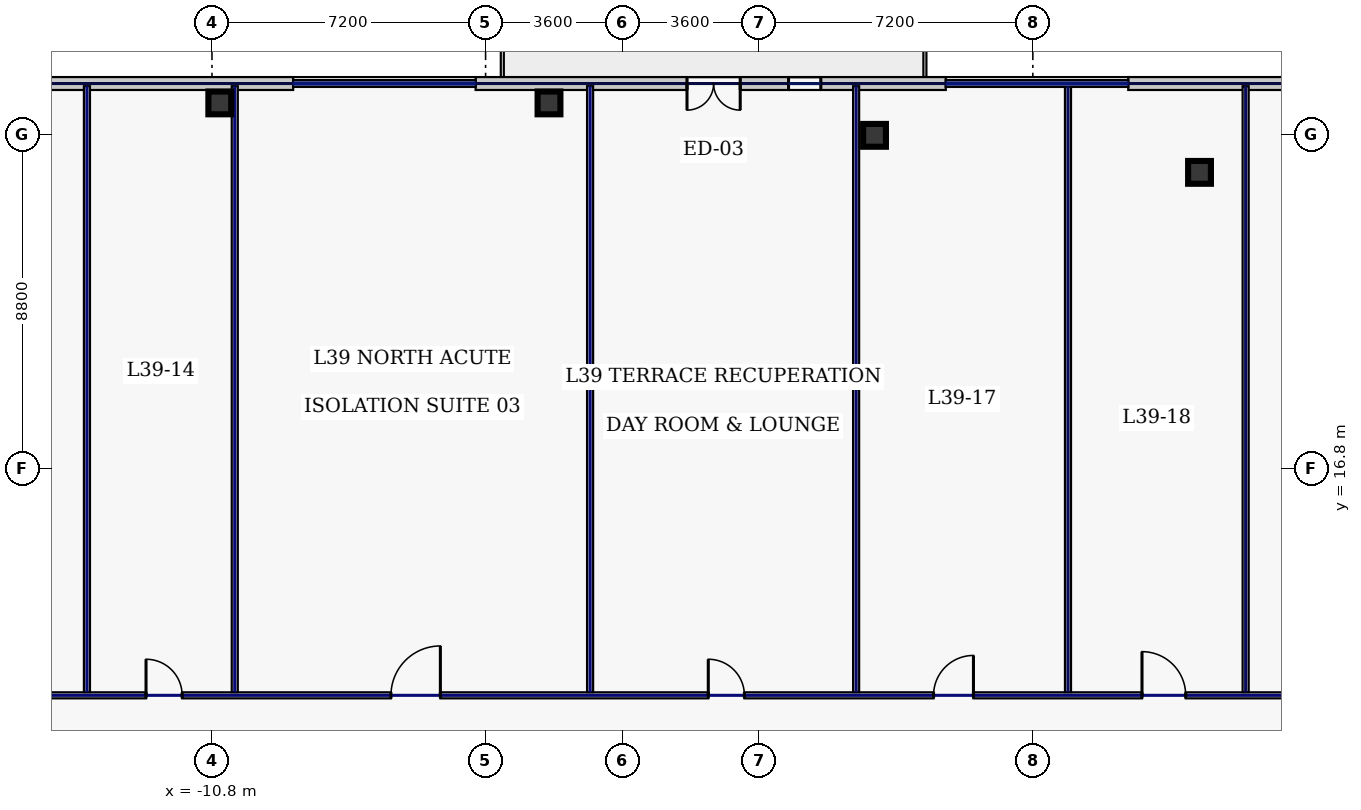
"""IFC4 building model, lengths in metres.
Left out: names, types, materials, properties, quantities, classifications, styles, units other than length and angle.
Written with IfcOpenShell. Run it as: python <this file> out.ifc"""

import sys

from ifc_helpers import new_model, si_unit, direction, frame, frame_2d, origin, origin_2d, place, context, subcontext, project, spatial, rectangle, hollow_rectangle, extrude, element, fill, save


model = new_model("IFC4")
c1 = context("Model", 3, precision=1e-05, world=origin(), true_north=direction((0.0, 1.0)))
c2 = subcontext(c1, "Body", "Model", "MODEL_VIEW")
j1 = project(units=[si_unit("LENGTHUNIT", "METRE"), si_unit("PLANEANGLEUNIT", "RADIAN")], contexts=[c1])
p1 = place(None, origin())
s1 = spatial("IfcSite", under=j1, at=p1, CompositionType="ELEMENT")
p2 = place(p1, origin())
s2 = spatial("IfcBuilding", under=s1, at=p2, CompositionType="ELEMENT")
p3 = place(p2, frame((0.0, 0.0, 172.2)))
s3 = spatial("IfcBuildingStorey", under=s2, at=p3, CompositionType="ELEMENT", Elevation=172.2)
for number, where, z_axis, x_axis in (
    (1, (15.186, 24.592, 0.0), (0.0, 0.0, 1.0), (1.0, 0.0, 0.0)),
    (2, (6.634, 25.567, 0.0), (0.0, 0.0, 1.0), (1.0, 0.0, 0.0)),
    (3, (-1.931, 26.42, 0.0), (0.0, 0.0, 1.0), (1.0, 0.0, 0.0)),
    (4, (-10.594, 26.42, 0.0), (0.0, 0.0, 1.0), (1.0, 0.0, 0.0)),
):
    element("IfcColumn", number, at=place(p3, frame(where, z_axis=z_axis, x_axis=x_axis)), inside=s3, PredefinedType="COLUMN", context=c2, shape_type="SweptSolid", body=[
        extrude(hollow_rectangle(XDim=0.6, YDim=0.6, WallThickness=0.028, at=origin_2d()), origin(), (0.0, 0.0, 1.0), 3.74),
    ])
p4 = place(p3, frame((33.4, 26.93, 0.0), z_axis=(0.0, 0.0, 1.0), x_axis=(-1.0, 0.0, 0.0)))
e5 = element("IfcWall", 5, at=p4, inside=s3, PredefinedType="STANDARD", context=c2, shape_type="SweptSolid", body=[
    extrude(rectangle(XDim=20.09, YDim=0.34, at=frame_2d((10.045, 0.0))), origin(), (0.0, 0.0, 1.0), 3.74),
])
p5 = place(p4, frame((11.071, 0.0, 0.7)))
e6 = element("IfcOpeningElement", 6, at=p5, cuts=e5, PredefinedType="OPENING", context=c2, shape_type="SweptSolid", body=[
    extrude(rectangle(XDim=0.85, YDim=1.85, at=frame_2d((0.425, 0.925))), frame((0.0, 0.18, 0.0), z_axis=(0.0, -1.0, 0.0), x_axis=(1.0, 0.0, 0.0)), (0.0, 0.0, 1.0), 0.36),
])
p6 = place(p4, frame((6.48, 0.0, 0.7)))
e7 = element("IfcOpeningElement", 7, at=p6, cuts=e5, PredefinedType="OPENING", context=c2, shape_type="SweptSolid", body=[
    extrude(rectangle(XDim=0.85, YDim=1.85, at=frame_2d((0.425, 0.925))), frame((0.0, 0.18, 0.0), z_axis=(0.0, -1.0, 0.0), x_axis=(1.0, 0.0, 0.0)), (0.0, 0.0, 1.0), 0.36),
])
p7 = place(p4, frame((2.591, 0.0, 0.7)))
e8 = element("IfcOpeningElement", 8, at=p7, cuts=e5, PredefinedType="OPENING", context=c2, shape_type="SweptSolid", body=[
    extrude(rectangle(XDim=1.8, YDim=2.2, at=frame_2d((0.9, 1.1))), frame((0.0, 0.18, 0.0), z_axis=(0.0, -1.0, 0.0), x_axis=(1.0, 0.0, 0.0)), (0.0, 0.0, 1.0), 0.36),
])
p8 = place(p3, frame((8.51, 26.93, 0.0), z_axis=(0.0, 0.0, 1.0), x_axis=(-1.0, 0.0, 0.0)))
e9 = element("IfcWall", 9, at=p8, inside=s3, PredefinedType="STANDARD", context=c2, shape_type="SweptSolid", body=[
    extrude(rectangle(XDim=12.373, YDim=0.34, at=frame_2d((6.187, 0.0))), origin(), (0.0, 0.0, 1.0), 3.74),
])
p9 = place(p8, frame((5.41, 0.0, 0.0)))
e10 = element("IfcOpeningElement", 10, at=p9, cuts=e9, PredefinedType="OPENING", context=c2, shape_type="SweptSolid", body=[
    extrude(rectangle(XDim=1.4, YDim=2.2, at=frame_2d((0.7, 1.1))), frame((0.0, 0.18, 0.0), z_axis=(0.0, -1.0, 0.0), x_axis=(1.0, 0.0, 0.0)), (0.0, 0.0, 1.0), 0.36),
])
p10 = place(p8, frame((3.289, 0.0, 0.7)))
e11 = element("IfcOpeningElement", 11, at=p10, cuts=e9, PredefinedType="OPENING", context=c2, shape_type="SweptSolid", body=[
    extrude(rectangle(XDim=0.85, YDim=1.85, at=frame_2d((0.425, 0.925))), frame((0.0, 0.18, 0.0), z_axis=(0.0, -1.0, 0.0), x_axis=(1.0, 0.0, 0.0)), (0.0, 0.0, 1.0), 0.36),
])
p11 = place(p3, frame((-8.663, 26.93, 0.0), z_axis=(0.0, 0.0, 1.0), x_axis=(-1.0, 0.0, 0.0)))
e12 = element("IfcWall", 12, at=p11, inside=s3, PredefinedType="STANDARD", context=c2, shape_type="SweptSolid", body=[
    extrude(rectangle(XDim=19.937, YDim=0.34, at=frame_2d((9.969, 0.0))), origin(), (0.0, 0.0, 1.0), 3.74),
])
p12 = place(p11, frame((7.455, 0.0, 0.22)))
e13 = element("IfcOpeningElement", 13, at=p12, cuts=e12, PredefinedType="OPENING", context=c2, shape_type="SweptSolid", body=[
    extrude(rectangle(XDim=1.6, YDim=1.2, at=frame_2d((0.8, 0.6))), frame((0.0, 0.18, 0.0), z_axis=(0.0, -1.0, 0.0), x_axis=(1.0, 0.0, 0.0)), (0.0, 0.0, 1.0), 0.36),
])
p13 = place(p3, frame((-24.965, 10.83, 0.0), z_axis=(0.0, 0.0, 1.0), x_axis=(1.0, 0.0, 0.0)))
e14 = element("IfcWall", 14, at=p13, inside=s3, PredefinedType="PARTITIONING", context=c2, shape_type="SweptSolid", body=[
    extrude(rectangle(XDim=49.93, YDim=0.16, at=frame_2d((24.965, 0.0))), origin(), (0.0, 0.0, 1.0), 3.74),
])
p14 = place(p13, frame((2.044, 0.0, 0.0)))
e15 = element("IfcOpeningElement", 15, at=p14, cuts=e14, PredefinedType="OPENING", context=c2, shape_type="SweptSolid", body=[
    extrude(rectangle(XDim=1.05, YDim=2.2, at=frame_2d((0.525, 1.1))), frame((0.0, 0.09, 0.0), z_axis=(0.0, -1.0, 0.0), x_axis=(1.0, 0.0, 0.0)), (0.0, 0.0, 1.0), 0.18),
])
p15 = place(p13, frame((7.33, 0.0, 0.0)))
e16 = element("IfcOpeningElement", 16, at=p15, cuts=e14, PredefinedType="OPENING", context=c2, shape_type="SweptSolid", body=[
    extrude(rectangle(XDim=0.95, YDim=2.2, at=frame_2d((0.475, 1.1))), frame((0.0, 0.09, 0.0), z_axis=(0.0, -1.0, 0.0), x_axis=(1.0, 0.0, 0.0)), (0.0, 0.0, 1.0), 0.18),
])
p16 = place(p13, frame((12.43, 0.0, 0.0)))
e17 = element("IfcOpeningElement", 17, at=p16, cuts=e14, PredefinedType="OPENING", context=c2, shape_type="SweptSolid", body=[
    extrude(rectangle(XDim=0.95, YDim=2.2, at=frame_2d((0.475, 1.1))), frame((0.0, 0.09, 0.0), z_axis=(0.0, -1.0, 0.0), x_axis=(1.0, 0.0, 0.0)), (0.0, 0.0, 1.0), 0.18),
])
p17 = place(p13, frame((18.875, 0.0, 0.0)))
e18 = element("IfcOpeningElement", 18, at=p17, cuts=e14, PredefinedType="OPENING", context=c2, shape_type="SweptSolid", body=[
    extrude(rectangle(XDim=1.3, YDim=2.2, at=frame_2d((0.65, 1.1))), frame((0.0, 0.09, 0.0), z_axis=(0.0, -1.0, 0.0), x_axis=(1.0, 0.0, 0.0)), (0.0, 0.0, 1.0), 0.18),
])
p18 = place(p13, frame((27.225, 0.0, 0.0)))
e19 = element("IfcOpeningElement", 19, at=p18, cuts=e14, PredefinedType="OPENING", context=c2, shape_type="SweptSolid", body=[
    extrude(rectangle(XDim=0.95, YDim=2.2, at=frame_2d((0.475, 1.1))), frame((0.0, 0.09, 0.0), z_axis=(0.0, -1.0, 0.0), x_axis=(1.0, 0.0, 0.0)), (0.0, 0.0, 1.0), 0.18),
])
p19 = place(p13, frame((33.153, 0.0, 0.0)))
e20 = element("IfcOpeningElement", 20, at=p19, cuts=e14, PredefinedType="OPENING", context=c2, shape_type="SweptSolid", body=[
    extrude(rectangle(XDim=1.05, YDim=2.2, at=frame_2d((0.525, 1.1))), frame((0.0, 0.09, 0.0), z_axis=(0.0, -1.0, 0.0), x_axis=(1.0, 0.0, 0.0)), (0.0, 0.0, 1.0), 0.18),
])
p20 = place(p13, frame((38.637, 0.0, 0.0)))
e21 = element("IfcOpeningElement", 21, at=p20, cuts=e14, PredefinedType="OPENING", context=c2, shape_type="SweptSolid", body=[
    extrude(rectangle(XDim=1.15, YDim=2.2, at=frame_2d((0.575, 1.1))), frame((0.0, 0.09, 0.0), z_axis=(0.0, -1.0, 0.0), x_axis=(1.0, 0.0, 0.0)), (0.0, 0.0, 1.0), 0.18),
])
p21 = place(p13, frame((42.8, 0.0, 0.0)))
e22 = element("IfcOpeningElement", 22, at=p21, cuts=e14, PredefinedType="OPENING", context=c2, shape_type="SweptSolid", body=[
    extrude(rectangle(XDim=1.3, YDim=2.2, at=frame_2d((0.65, 1.1))), frame((0.0, 0.09, 0.0), z_axis=(0.0, -1.0, 0.0), x_axis=(1.0, 0.0, 0.0)), (0.0, 0.0, 1.0), 0.18),
])
p22 = place(p13, frame((47.106, 0.0, 0.0)))
e23 = element("IfcOpeningElement", 23, at=p22, cuts=e14, PredefinedType="OPENING", context=c2, shape_type="SweptSolid", body=[
    extrude(rectangle(XDim=0.95, YDim=2.2, at=frame_2d((0.475, 1.1))), frame((0.0, 0.09, 0.0), z_axis=(0.0, -1.0, 0.0), x_axis=(1.0, 0.0, 0.0)), (0.0, 0.0, 1.0), 0.18),
])
for number, where, z_axis, x_axis in (
    (24, (-10.2, 10.915, 0.0), (0.0, 0.0, 1.0), (0.0, 1.0, 0.0)),
    (25, (-0.85, 10.915, 0.0), (0.0, 0.0, 1.0), (0.0, 1.0, 0.0)),
):
    element("IfcWall", number, at=place(p3, frame(where, z_axis=z_axis, x_axis=x_axis)), inside=s3, PredefinedType="PARTITIONING", context=c2, shape_type="SweptSolid", body=[
        extrude(rectangle(XDim=15.945, YDim=0.16, at=frame_2d((7.973, 0.0))), origin(), (0.0, 0.0, 1.0), 3.74),
    ])
p23 = place(p3, frame((6.15, 10.915, 0.0), z_axis=(0.0, 0.0, 1.0), x_axis=(0.0, 1.0, 0.0)))
e26 = element("IfcWall", 26, at=p23, inside=s3, PredefinedType="PARTITIONING", context=c2, shape_type="SweptSolid", body=[
    extrude(rectangle(XDim=15.945, YDim=0.16, at=frame_2d((7.973, 0.0))), origin(), (0.0, 0.0, 1.0), 3.285),
])
p24 = place(p3, frame((16.4, 10.915, 0.0), z_axis=(0.0, 0.0, 1.0), x_axis=(0.0, 1.0, 0.0)))
e27 = element("IfcWall", 27, at=p24, inside=s3, PredefinedType="PARTITIONING", context=c2, shape_type="SweptSolid", body=[
    extrude(rectangle(XDim=15.945, YDim=0.16, at=frame_2d((7.973, 0.0))), origin(), (0.0, 0.0, 1.0), 1.535),
])
p25 = place(p3, frame((-14.09, 10.915, 0.0), z_axis=(0.0, 0.0, 1.0), x_axis=(0.0, 1.0, 0.0)))
e28 = element("IfcWall", 28, at=p25, inside=s3, PredefinedType="PARTITIONING", context=c2, shape_type="SweptSolid", body=[
    extrude(rectangle(XDim=15.945, YDim=0.16, at=frame_2d((7.973, 0.0))), origin(), (0.0, 0.0, 1.0), 3.74),
])
p26 = place(p3, frame((11.725, 10.915, 0.0), z_axis=(0.0, 0.0, 1.0), x_axis=(0.0, 1.0, 0.0)))
e29 = element("IfcWall", 29, at=p26, inside=s3, PredefinedType="PARTITIONING", context=c2, shape_type="SweptSolid", body=[
    extrude(rectangle(XDim=15.945, YDim=0.16, at=frame_2d((7.973, 0.0))), origin(), (0.0, 0.0, 1.0), 1.535),
])
p27 = place(p9, origin())
e30 = element("IfcDoor", 30, at=p27, inside=s3, OperationType="DOUBLE_SWING_LEFT", PredefinedType="DOOR", context=c2, shape_type="SweptSolid", body=[
    extrude(rectangle(XDim=1.4, YDim=2.2, at=frame_2d((0.7, 1.1))), frame((0.0, 0.025, 0.0), z_axis=(0.0, -1.0, 0.0), x_axis=(1.0, 0.0, 0.0)), (0.0, 0.0, 1.0), 0.05),
])
fill(e10, e30)
p28 = place(p10, origin())
e31 = element("IfcWindow", 31, at=p28, inside=s3, PartitioningType="SINGLE_PANEL", PredefinedType="WINDOW", context=c2, shape_type="SweptSolid", body=[
    extrude(rectangle(XDim=0.85, YDim=1.85, at=frame_2d((0.425, 0.925))), frame((0.0, 0.03, 0.0), z_axis=(0.0, -1.0, 0.0), x_axis=(1.0, 0.0, 0.0)), (0.0, 0.0, 1.0), 0.06),
])
fill(e11, e31)
p29 = place(p16, origin())
e32 = element("IfcDoor", 32, at=p29, inside=s3, OperationType="SINGLE_SWING_LEFT", PredefinedType="DOOR", context=c2, shape_type="SweptSolid", body=[
    extrude(rectangle(XDim=0.95, YDim=2.2, at=frame_2d((0.475, 1.1))), frame((0.0, 0.025, 0.0), z_axis=(0.0, -1.0, 0.0), x_axis=(1.0, 0.0, 0.0)), (0.0, 0.0, 1.0), 0.05),
])
fill(e17, e32)
p30 = place(p17, origin())
e33 = element("IfcDoor", 33, at=p30, inside=s3, OperationType="SINGLE_SWING_RIGHT", PredefinedType="DOOR", context=c2, shape_type="SweptSolid", body=[
    extrude(rectangle(XDim=1.3, YDim=2.2, at=frame_2d((0.65, 1.1))), frame((0.0, 0.025, 0.0), z_axis=(0.0, -1.0, 0.0), x_axis=(1.0, 0.0, 0.0)), (0.0, 0.0, 1.0), 0.05),
])
fill(e18, e33)
p31 = place(p18, origin())
e34 = element("IfcDoor", 34, at=p31, inside=s3, OperationType="SINGLE_SWING_LEFT", PredefinedType="DOOR", context=c2, shape_type="SweptSolid", body=[
    extrude(rectangle(XDim=0.95, YDim=2.2, at=frame_2d((0.475, 1.1))), frame((0.0, 0.025, 0.0), z_axis=(0.0, -1.0, 0.0), x_axis=(1.0, 0.0, 0.0)), (0.0, 0.0, 1.0), 0.05),
])
fill(e19, e34)
p32 = place(p19, origin())
e35 = element("IfcDoor", 35, at=p32, inside=s3, OperationType="SINGLE_SWING_RIGHT", PredefinedType="DOOR", context=c2, shape_type="SweptSolid", body=[
    extrude(rectangle(XDim=1.05, YDim=2.2, at=frame_2d((0.525, 1.1))), frame((0.0, 0.025, 0.0), z_axis=(0.0, -1.0, 0.0), x_axis=(1.0, 0.0, 0.0)), (0.0, 0.0, 1.0), 0.05),
])
fill(e20, e35)
p33 = place(p20, origin())
e36 = element("IfcDoor", 36, at=p33, inside=s3, OperationType="SINGLE_SWING_LEFT", PredefinedType="DOOR", context=c2, shape_type="SweptSolid", body=[
    extrude(rectangle(XDim=1.15, YDim=2.2, at=frame_2d((0.575, 1.1))), frame((0.0, 0.025, 0.0), z_axis=(0.0, -1.0, 0.0), x_axis=(1.0, 0.0, 0.0)), (0.0, 0.0, 1.0), 0.05),
])
fill(e21, e36)
save(model, sys.argv[1])
